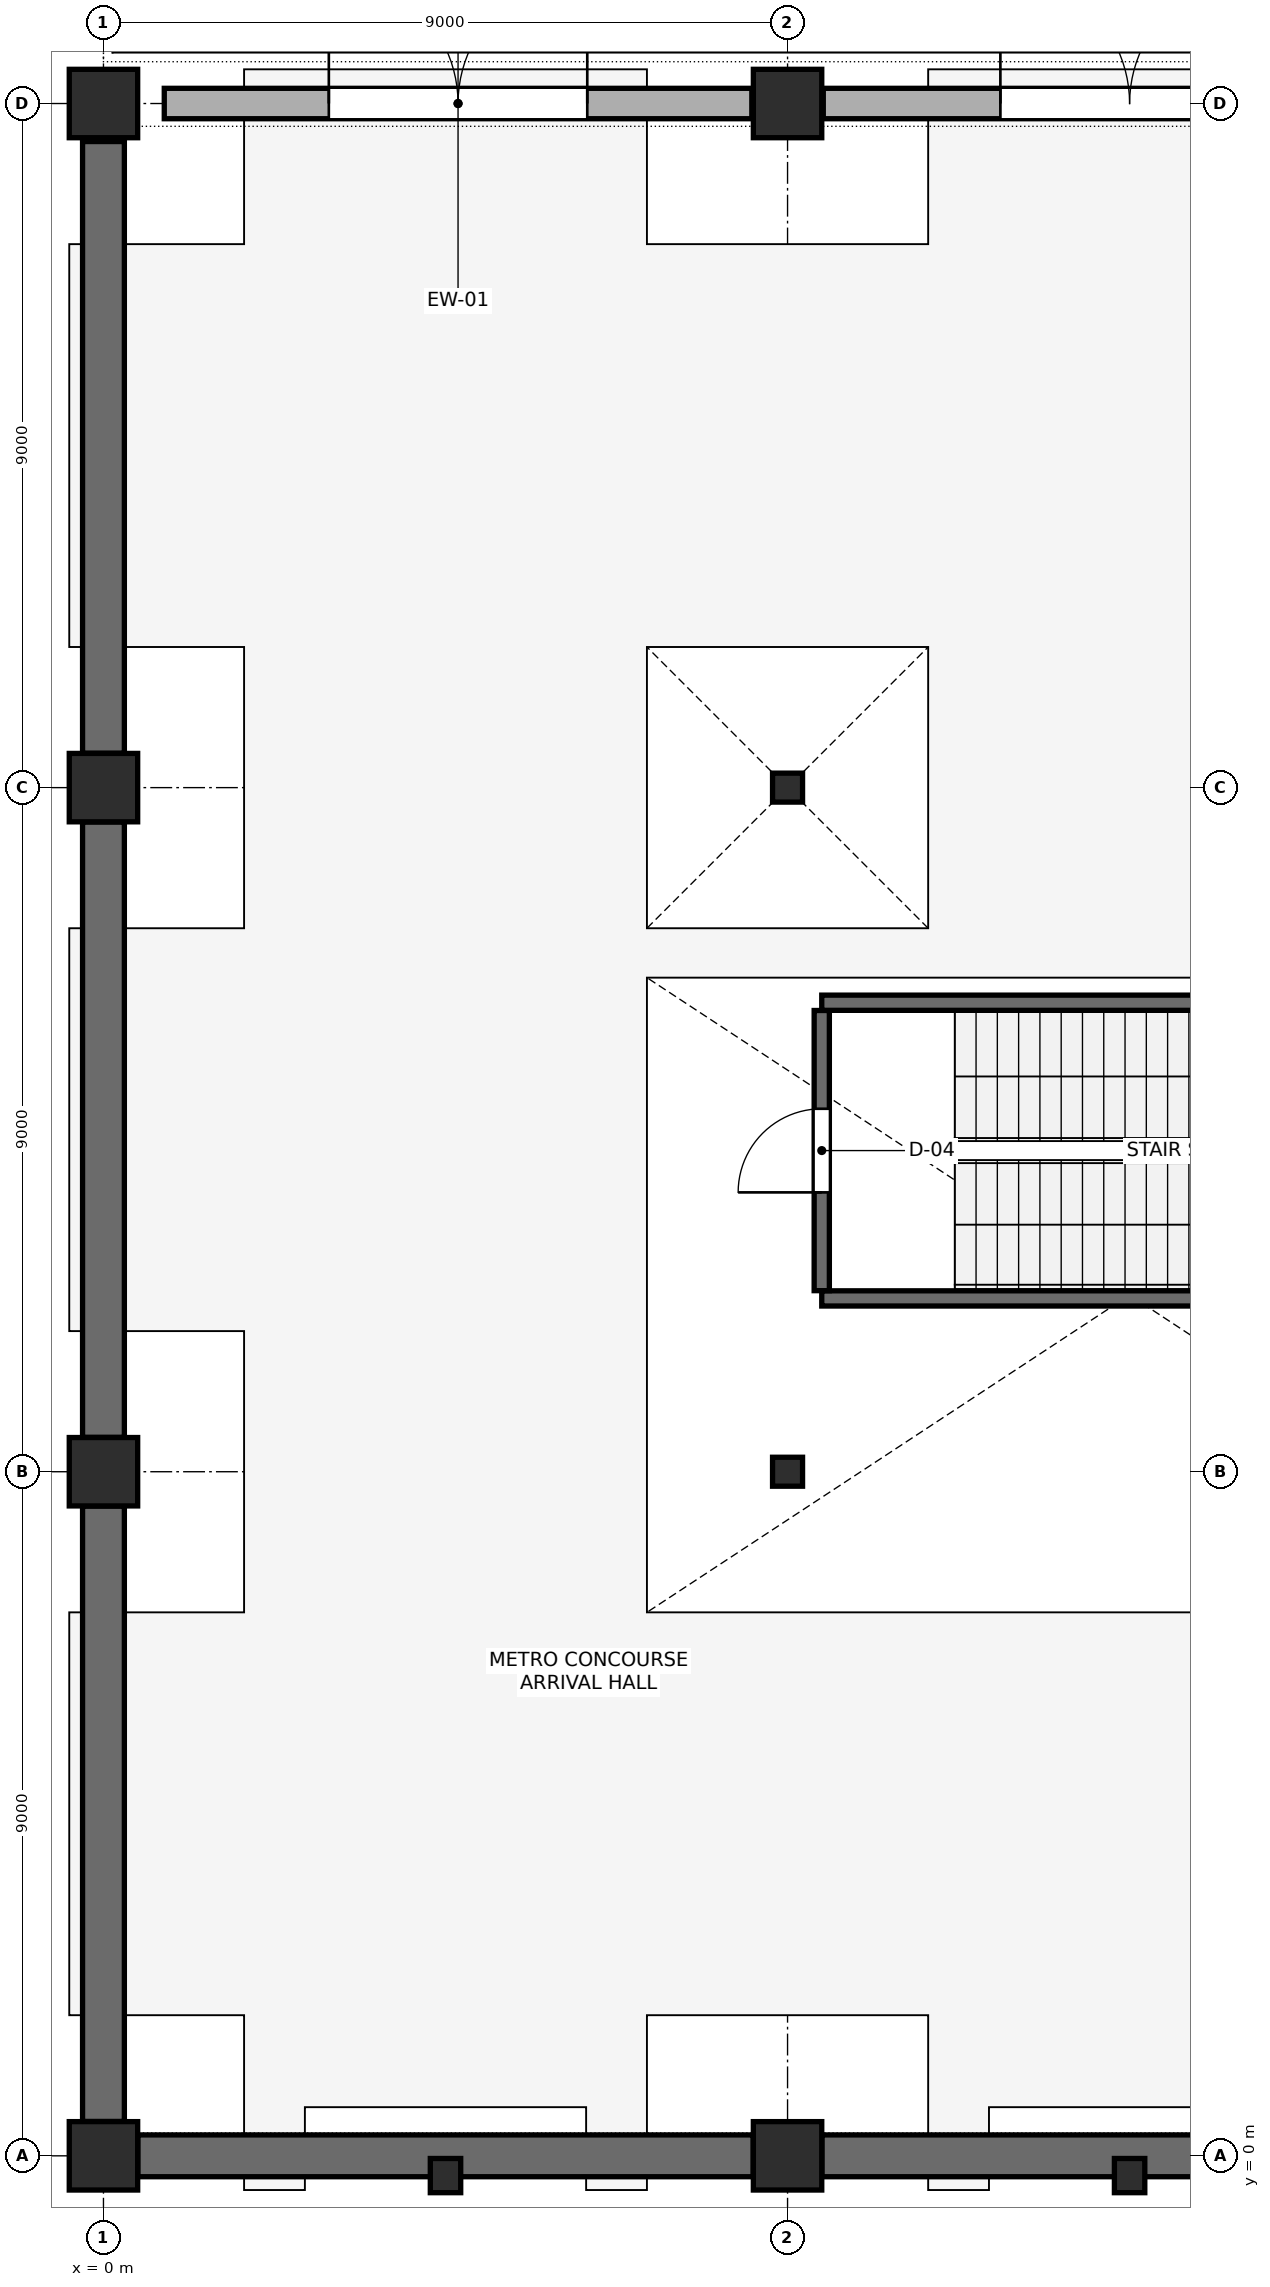
"""IFC4 building model, lengths in metres.
Left out: names, types, materials, properties, quantities, classifications, styles, units other than length and angle.
Written with IfcOpenShell. Run it as: python <this file> out.ifc"""

import sys

from ifc_helpers import new_model, si_unit, direction, frame, frame_2d, origin, origin_2d, place, context, subcontext, project, spatial, rectangle, i_section, extrude, element, fill, save


model = new_model("IFC4")
c1 = context("Model", 3, precision=1e-05, world=origin(), true_north=direction((0.0, 1.0)))
c2 = subcontext(c1, "Body", "Model", "MODEL_VIEW")
j1 = project(units=[si_unit("LENGTHUNIT", "METRE"), si_unit("PLANEANGLEUNIT", "RADIAN")], contexts=[c1])
p1 = place(None, origin())
s1 = spatial("IfcSite", under=j1, at=p1, CompositionType="ELEMENT")
p2 = place(p1, origin())
s2 = spatial("IfcBuilding", under=s1, at=p2, CompositionType="ELEMENT")
p3 = place(p2, frame((0.0, 0.0, -5.4)))
s3 = spatial("IfcBuildingStorey", under=s2, at=p3, CompositionType="ELEMENT", Elevation=-5.4)
for number, where, z_axis, x_axis in (
    (1, (0.0, 0.0, 0.0), (0.0, 0.0, 1.0), (1.0, 0.0, 0.0)),
    (2, (0.0, 9.0, 0.0), (0.0, 0.0, 1.0), (1.0, 0.0, 0.0)),
    (3, (0.0, 18.0, 0.0), (0.0, 0.0, 1.0), (1.0, 0.0, 0.0)),
    (4, (0.0, 27.0, 0.0), (0.0, 0.0, 1.0), (1.0, 0.0, 0.0)),
    (5, (9.0, 0.0, 0.0), (0.0, 0.0, 1.0), (1.0, 0.0, 0.0)),
):
    element("IfcColumn", number, at=place(p3, frame(where, z_axis=z_axis, x_axis=x_axis)), inside=s3, PredefinedType="COLUMN", context=c2, shape_type="SweptSolid", body=[
        extrude(rectangle(XDim=0.9, YDim=0.9, at=origin_2d()), origin(), (0.0, 0.0, 1.0), 5.4),
    ])
for number, where, z_axis, x_axis in (
    (6, (9.0, 9.0, 0.0), (0.0, 0.0, 1.0), (1.0, 0.0, 0.0)),
    (7, (9.0, 18.0, 0.0), (0.0, 0.0, 1.0), (1.0, 0.0, 0.0)),
):
    element("IfcColumn", number, at=place(p3, frame(where, z_axis=z_axis, x_axis=x_axis)), inside=s3, PredefinedType="COLUMN", context=c2, shape_type="SweptSolid", body=[
        extrude(i_section(OverallWidth=0.395, OverallDepth=0.381, WebThickness=0.018, FlangeThickness=0.03, FilletRadius=0.015, at=origin_2d()), origin(), (0.0, 0.0, 1.0), 5.4),
    ])
p4 = place(p3, frame((9.0, 27.0, 0.0), z_axis=(0.0, 0.0, 1.0), x_axis=(1.0, 0.0, 0.0)))
e8 = element("IfcColumn", 8, at=p4, inside=s3, PredefinedType="COLUMN", context=c2, shape_type="SweptSolid", body=[
    extrude(rectangle(XDim=0.9, YDim=0.9, at=origin_2d()), origin(), (0.0, 0.0, 1.0), 5.4),
])
for number, where, z_axis, x_axis in (
    (9, (4.5, -0.26, 0.0), (0.0, 0.0, 1.0), (1.0, 0.0, 0.0)),
    (10, (13.5, -0.26, 0.0), (0.0, 0.0, 1.0), (1.0, 0.0, 0.0)),
):
    element("IfcColumn", number, at=place(p3, frame(where, z_axis=z_axis, x_axis=x_axis)), inside=s3, PredefinedType="PILASTER", context=c2, shape_type="SweptSolid", body=[
        extrude(rectangle(XDim=0.4, YDim=0.45, at=origin_2d()), origin(), (0.0, 0.0, 1.0), 5.4),
    ])
for number, where, z_axis, x_axis in (
    (11, (17.548, 0.0, 0.0), (0.0, 0.0, 1.0), (-1.0, 0.0, 0.0)),
    (12, (8.548, 0.0, 0.0), (0.0, 0.0, 1.0), (-1.0, 0.0, 0.0)),
    (13, (0.0, 0.452, 0.0), (0.0, 0.0, 1.0), (0.0, 1.0, 0.0)),
    (14, (0.0, 9.452, 0.0), (0.0, 0.0, 1.0), (0.0, 1.0, 0.0)),
):
    element("IfcWall", number, at=place(p3, frame(where, z_axis=z_axis, x_axis=x_axis)), inside=s3, PredefinedType="SOLIDWALL", context=c2, shape_type="SweptSolid", body=[
        extrude(rectangle(XDim=8.096, YDim=0.55, at=frame_2d((4.048, 0.0))), origin(), (0.0, 0.0, 1.0), 5.04),
    ])
p5 = place(p3, frame((0.0, 18.452, 0.0), z_axis=(0.0, 0.0, 1.0), x_axis=(0.0, 1.0, 0.0)))
e15 = element("IfcWall", 15, at=p5, inside=s3, PredefinedType="SOLIDWALL", context=c2, shape_type="SweptSolid", body=[
    extrude(rectangle(XDim=8.048, YDim=0.55, at=frame_2d((4.024, 0.0))), origin(), (0.0, 0.0, 1.0), 5.04),
])
p6 = place(p3, frame((0.8, 27.0, 0.0), z_axis=(0.0, 0.0, 1.0), x_axis=(1.0, 0.0, 0.0)))
e16 = element("IfcWall", 16, at=p6, inside=s3, PredefinedType="STANDARD", context=c2, shape_type="SweptSolid", body=[
    extrude(rectangle(XDim=7.73, YDim=0.4, at=frame_2d((3.865, 0.0))), origin(), (0.0, 0.0, 1.0), 4.427),
])
p7 = place(p6, frame((2.165, 0.0, 0.0)))
e17 = element("IfcOpeningElement", 17, at=p7, cuts=e16, PredefinedType="OPENING", context=c2, shape_type="SweptSolid", body=[
    extrude(rectangle(XDim=3.4, YDim=2.75, at=frame_2d((1.7, 1.375))), frame((0.0, 0.21, 0.0), z_axis=(0.0, -1.0, 0.0), x_axis=(1.0, 0.0, 0.0)), (0.0, 0.0, 1.0), 0.42),
])
p8 = place(p3, frame((9.47, 27.0, 0.0), z_axis=(0.0, 0.0, 1.0), x_axis=(1.0, 0.0, 0.0)))
e18 = element("IfcWall", 18, at=p8, inside=s3, PredefinedType="STANDARD", context=c2, shape_type="SweptSolid", body=[
    extrude(rectangle(XDim=8.06, YDim=0.4, at=frame_2d((4.03, 0.0))), origin(), (0.0, 0.0, 1.0), 4.427),
])
p9 = place(p8, frame((2.33, 0.0, 0.0)))
e19 = element("IfcOpeningElement", 19, at=p9, cuts=e18, PredefinedType="OPENING", context=c2, shape_type="SweptSolid", body=[
    extrude(rectangle(XDim=3.4, YDim=2.75, at=frame_2d((1.7, 1.375))), frame((0.0, 0.21, 0.0), z_axis=(0.0, -1.0, 0.0), x_axis=(1.0, 0.0, 0.0)), (0.0, 0.0, 1.0), 0.42),
])
p10 = place(p3, frame((9.45, 11.28, 0.0), z_axis=(0.0, 0.0, 1.0), x_axis=(1.0, 0.0, 0.0)))
e20 = element("IfcWall", 20, at=p10, inside=s3, PredefinedType="SHEAR", context=c2, shape_type="SweptSolid", body=[
    extrude(rectangle(XDim=7.95, YDim=0.2, at=frame_2d((3.975, 0.0))), origin(), (0.0, 0.0, 1.0), 5.4),
])
p11 = place(p3, frame((9.45, 11.382, 0.0), z_axis=(0.0, 0.0, 1.0), x_axis=(0.0, 1.0, 0.0)))
e21 = element("IfcWall", 21, at=p11, inside=s3, PredefinedType="SHEAR", context=c2, shape_type="SweptSolid", body=[
    extrude(rectangle(XDim=3.686, YDim=0.2, at=frame_2d((1.843, 0.0))), origin(), (0.0, 0.0, 1.0), 5.4),
])
p12 = place(p11, frame((1.293, 0.0, 0.0)))
e22 = element("IfcOpeningElement", 22, at=p12, cuts=e21, PredefinedType="OPENING", context=c2, shape_type="SweptSolid", body=[
    extrude(rectangle(XDim=1.1, YDim=2.15, at=frame_2d((0.55, 1.075))), frame((0.0, 0.11, 0.0), z_axis=(0.0, -1.0, 0.0), x_axis=(1.0, 0.0, 0.0)), (0.0, 0.0, 1.0), 0.22),
])
p13 = place(p3, frame((9.45, 15.17, 0.0), z_axis=(0.0, 0.0, 1.0), x_axis=(1.0, 0.0, 0.0)))
e23 = element("IfcWall", 23, at=p13, inside=s3, PredefinedType="SHEAR", context=c2, shape_type="SweptSolid", body=[
    extrude(rectangle(XDim=7.95, YDim=0.2, at=frame_2d((3.975, 0.0))), origin(), (0.0, 0.0, 1.0), 5.4),
])
p14 = place(p7, origin())
e24 = element("IfcDoor", 24, at=p14, inside=s3, OperationType="DOUBLE_DOOR_SINGLE_SWING", PredefinedType="DOOR", context=c2, shape_type="SweptSolid", body=[
    extrude(rectangle(XDim=3.4, YDim=2.75, at=frame_2d((1.7, 1.375))), frame((0.0, 0.025, 0.0), z_axis=(0.0, -1.0, 0.0), x_axis=(1.0, 0.0, 0.0)), (0.0, 0.0, 1.0), 0.05),
])
fill(e17, e24)
p15 = place(p9, origin())
e25 = element("IfcDoor", 25, at=p15, inside=s3, OperationType="DOUBLE_DOOR_SINGLE_SWING", PredefinedType="DOOR", context=c2, shape_type="SweptSolid", body=[
    extrude(rectangle(XDim=3.4, YDim=2.75, at=frame_2d((1.7, 1.375))), frame((0.0, 0.025, 0.0), z_axis=(0.0, -1.0, 0.0), x_axis=(1.0, 0.0, 0.0)), (0.0, 0.0, 1.0), 0.05),
])
fill(e19, e25)
p16 = place(p12, frame((1.1, 0.0, 0.0), z_axis=(0.0, 0.0, 1.0), x_axis=(-1.0, 0.0, 0.0)))
e26 = element("IfcDoor", 26, at=p16, inside=s3, OperationType="SINGLE_SWING_RIGHT", PredefinedType="DOOR", context=c2, shape_type="SweptSolid", body=[
    extrude(rectangle(XDim=1.1, YDim=2.15, at=frame_2d((0.55, 1.075))), frame((0.0, 0.025, 0.0), z_axis=(0.0, -1.0, 0.0), x_axis=(1.0, 0.0, 0.0)), (0.0, 0.0, 1.0), 0.05),
])
fill(e22, e26)
save(model, sys.argv[1])
